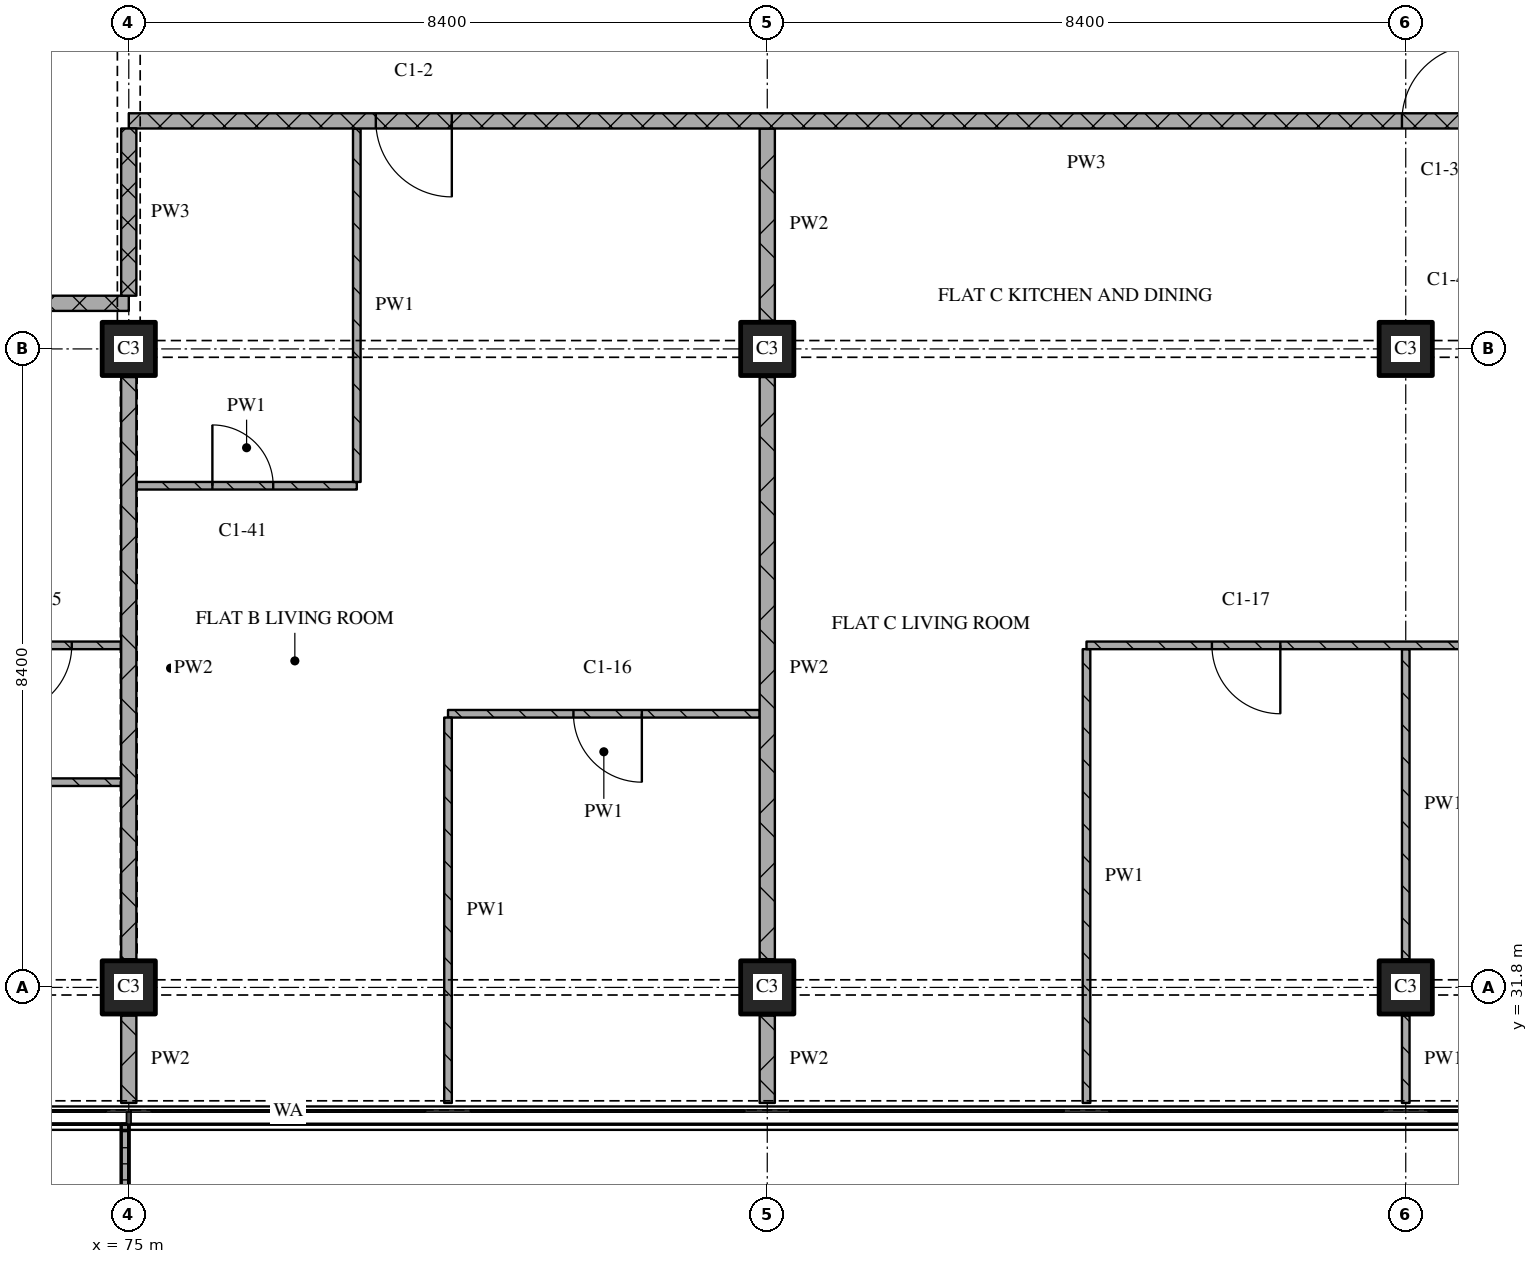
"""IFC4 building model, lengths in metres.
Left out: names, types, materials, properties, quantities, classifications, styles, units other than length and angle.
Written with IfcOpenShell. Run it as: python <this file> out.ifc"""

import sys

from ifc_helpers import new_model, si_unit, direction, frame, frame_2d, origin, origin_2d, place, context, subcontext, project, spatial, polyline, rectangle, outline, extrude, element, fill, save


model = new_model("IFC4")
c1 = context("Model", 3, precision=1e-05, world=origin(), true_north=direction((0.0, 1.0)))
c2 = subcontext(c1, "Body", "Model", "MODEL_VIEW")
j1 = project(units=[si_unit("LENGTHUNIT", "METRE"), si_unit("PLANEANGLEUNIT", "RADIAN")], contexts=[c1])
p1 = place(None, origin())
s1 = spatial("IfcSite", under=j1, at=p1, CompositionType="ELEMENT")
p2 = place(p1, origin())
s2 = spatial("IfcBuilding", under=s1, at=p2, CompositionType="ELEMENT")
p3 = place(p2, frame((0.0, 0.0, 154.65)))
s3 = spatial("IfcBuildingStorey", under=s2, at=p3, CompositionType="ELEMENT", Elevation=154.65)
for number, where, z_axis, x_axis in (
    (1, (75.0, 31.8, 0.0), (0.0, 0.0, 1.0), (1.0, 0.0, 0.0)),
    (2, (75.0, 40.2, 0.0), (0.0, 0.0, 1.0), (1.0, 0.0, 0.0)),
    (3, (83.4, 31.8, 0.0), (0.0, 0.0, 1.0), (1.0, 0.0, 0.0)),
    (4, (83.4, 40.2, 0.0), (0.0, 0.0, 1.0), (1.0, 0.0, 0.0)),
    (5, (91.8, 31.8, 0.0), (0.0, 0.0, 1.0), (1.0, 0.0, 0.0)),
    (6, (91.8, 40.2, 0.0), (0.0, 0.0, 1.0), (1.0, 0.0, 0.0)),
):
    element("IfcColumn", number, at=place(p3, frame(where, z_axis=z_axis, x_axis=x_axis)), inside=s3, PredefinedType="COLUMN", context=c2, shape_type="SweptSolid", body=[
        extrude(rectangle(XDim=0.7, YDim=0.7, at=origin_2d()), origin(), (0.0, 0.0, 1.0), 3.6),
    ])
p4 = place(p3, origin())
e7 = element("IfcWall", 7, at=p4, inside=s3, PredefinedType="SOLIDWALL", context=c2, shape_type="SweptSolid", body=[
    extrude(outline(polyline([(70.8, 30.0), (70.9, 30.0), (70.9, 28.367), (74.9, 28.367), (74.9, 30.0), (75.0, 30.0), (75.0, 28.267), (70.8, 28.267), (70.8, 30.0)])), origin(), (0.0, 0.0, 1.0), 1.0),
])
p5 = place(p3, frame((74.9, 34.5, 0.0), z_axis=(0.0, 0.0, 1.0), x_axis=(-1.0, 0.0, 0.0)))
e8 = element("IfcWall", 8, at=p5, inside=s3, PredefinedType="PARTITIONING", context=c2, shape_type="SweptSolid", body=[
    extrude(rectangle(XDim=16.7, YDim=0.1, at=frame_2d((8.35, 0.0))), origin(), (0.0, 0.0, 1.0), 3.32),
])
p6 = place(p5, frame((3.65, 0.0, 0.0)))
e9 = element("IfcOpeningElement", 9, at=p6, cuts=e8, PredefinedType="OPENING", context=c2, shape_type="SweptSolid", body=[
    extrude(rectangle(XDim=0.9, YDim=2.1, at=frame_2d((0.45, 1.05))), frame((0.0, 0.06, 0.0), z_axis=(0.0, -1.0, 0.0), x_axis=(1.0, 0.0, 0.0)), (0.0, 0.0, 1.0), 0.12),
])
p7 = place(p5, frame((12.05, 0.0, 0.0)))
e10 = element("IfcOpeningElement", 10, at=p7, cuts=e8, PredefinedType="OPENING", context=c2, shape_type="SweptSolid", body=[
    extrude(rectangle(XDim=0.9, YDim=2.1, at=frame_2d((0.45, 1.05))), frame((0.0, 0.06, 0.0), z_axis=(0.0, -1.0, 0.0), x_axis=(1.0, 0.0, 0.0)), (0.0, 0.0, 1.0), 0.12),
])
p8 = place(p3, frame((83.3, 35.4, 0.0), z_axis=(0.0, 0.0, 1.0), x_axis=(-1.0, 0.0, 0.0)))
e11 = element("IfcWall", 11, at=p8, inside=s3, PredefinedType="PARTITIONING", context=c2, shape_type="SweptSolid", body=[
    extrude(rectangle(XDim=4.1, YDim=0.1, at=frame_2d((2.05, 0.0))), origin(), (0.0, 0.0, 1.0), 3.32),
])
p9 = place(p8, frame((1.55, 0.0, 0.0)))
e12 = element("IfcOpeningElement", 12, at=p9, cuts=e11, PredefinedType="OPENING", context=c2, shape_type="SweptSolid", body=[
    extrude(rectangle(XDim=0.9, YDim=2.1, at=frame_2d((0.45, 1.05))), frame((0.0, 0.06, 0.0), z_axis=(0.0, -1.0, 0.0), x_axis=(1.0, 0.0, 0.0)), (0.0, 0.0, 1.0), 0.12),
])
p10 = place(p3, frame((63.6, 36.3, 0.0), z_axis=(0.0, 0.0, 1.0), x_axis=(1.0, 0.0, 0.0)))
e13 = element("IfcWall", 13, at=p10, inside=s3, PredefinedType="PARTITIONING", context=c2, shape_type="SweptSolid", body=[
    extrude(rectangle(XDim=11.3, YDim=0.1, at=frame_2d((5.65, 0.0))), origin(), (0.0, 0.0, 1.0), 3.32),
])
p11 = place(p10, frame((6.35, 0.0, 0.0)))
e14 = element("IfcOpeningElement", 14, at=p11, cuts=e13, PredefinedType="OPENING", context=c2, shape_type="SweptSolid", body=[
    extrude(rectangle(XDim=0.8, YDim=2.1, at=frame_2d((0.4, 1.05))), frame((0.0, 0.06, 0.0), z_axis=(0.0, -1.0, 0.0), x_axis=(1.0, 0.0, 0.0)), (0.0, 0.0, 1.0), 0.12),
])
p12 = place(p10, frame((9.75, 0.0, 0.0)))
e15 = element("IfcOpeningElement", 15, at=p12, cuts=e13, PredefinedType="OPENING", context=c2, shape_type="SweptSolid", body=[
    extrude(rectangle(XDim=0.9, YDim=2.1, at=frame_2d((0.45, 1.05))), frame((0.0, 0.06, 0.0), z_axis=(0.0, -1.0, 0.0), x_axis=(1.0, 0.0, 0.0)), (0.0, 0.0, 1.0), 0.12),
])
p13 = place(p3, frame((75.1, 38.4, 0.0), z_axis=(0.0, 0.0, 1.0), x_axis=(1.0, 0.0, 0.0)))
e16 = element("IfcWall", 16, at=p13, inside=s3, PredefinedType="PARTITIONING", context=c2, shape_type="SweptSolid", body=[
    extrude(rectangle(XDim=2.9, YDim=0.1, at=frame_2d((1.45, 0.0))), origin(), (0.0, 0.0, 1.0), 3.32),
])
p14 = place(p13, frame((1.0, 0.0, 0.0)))
e17 = element("IfcOpeningElement", 17, at=p14, cuts=e16, PredefinedType="OPENING", context=c2, shape_type="SweptSolid", body=[
    extrude(rectangle(XDim=0.8, YDim=2.1, at=frame_2d((0.4, 1.05))), frame((0.0, 0.06, 0.0), z_axis=(0.0, -1.0, 0.0), x_axis=(1.0, 0.0, 0.0)), (0.0, 0.0, 1.0), 0.12),
])
p15 = place(p3, frame((75.0, 40.8, 0.0), z_axis=(0.0, 0.0, 1.0), x_axis=(-1.0, 0.0, 0.0)))
e18 = element("IfcWall", 18, at=p15, inside=s3, PredefinedType="PARTITIONING", context=c2, shape_type="SweptSolid", body=[
    extrude(rectangle(XDim=24.28, YDim=0.2, at=frame_2d((12.14, 0.0))), origin(), (0.0, 0.0, 1.0), 3.32),
])
p16 = place(p15, frame((11.65, 0.0, 0.0)))
e19 = element("IfcOpeningElement", 19, at=p16, cuts=e18, PredefinedType="OPENING", context=c2, shape_type="SweptSolid", body=[
    extrude(rectangle(XDim=1.0, YDim=2.1, at=frame_2d((0.5, 1.05))), frame((0.0, 0.11, 0.0), z_axis=(0.0, -1.0, 0.0), x_axis=(1.0, 0.0, 0.0)), (0.0, 0.0, 1.0), 0.22),
])
p17 = place(p3, frame((100.2, 43.2, 0.0), z_axis=(0.0, 0.0, 1.0), x_axis=(-1.0, 0.0, 0.0)))
e20 = element("IfcWall", 20, at=p17, inside=s3, PredefinedType="PARTITIONING", context=c2, shape_type="SweptSolid", body=[
    extrude(rectangle(XDim=25.2, YDim=0.2, at=frame_2d((12.6, 0.0))), origin(), (0.0, 0.0, 1.0), 3.32),
])
p18 = place(p17, frame((7.45, 0.0, 0.0)))
e21 = element("IfcOpeningElement", 21, at=p18, cuts=e20, PredefinedType="OPENING", context=c2, shape_type="SweptSolid", body=[
    extrude(rectangle(XDim=1.0, YDim=2.1, at=frame_2d((0.5, 1.05))), frame((0.0, 0.11, 0.0), z_axis=(0.0, -1.0, 0.0), x_axis=(1.0, 0.0, 0.0)), (0.0, 0.0, 1.0), 0.22),
])
p19 = place(p17, frame((20.95, 0.0, 0.0)))
e22 = element("IfcOpeningElement", 22, at=p19, cuts=e20, PredefinedType="OPENING", context=c2, shape_type="SweptSolid", body=[
    extrude(rectangle(XDim=1.0, YDim=2.1, at=frame_2d((0.5, 1.05))), frame((0.0, 0.11, 0.0), z_axis=(0.0, -1.0, 0.0), x_axis=(1.0, 0.0, 0.0)), (0.0, 0.0, 1.0), 0.22),
])
p20 = place(p3, frame((75.0, 43.1, 0.0), z_axis=(0.0, 0.0, 1.0), x_axis=(0.0, -1.0, 0.0)))
e23 = element("IfcWall", 23, at=p20, inside=s3, PredefinedType="PARTITIONING", context=c2, shape_type="SweptSolid", body=[
    extrude(rectangle(XDim=2.2, YDim=0.2, at=frame_2d((1.1, 0.0))), origin(), (0.0, 0.0, 1.0), 2.43),
])
p21 = place(p3, frame((75.0, 31.43, 0.0), z_axis=(0.0, 0.0, 1.0), x_axis=(0.0, -1.0, 0.0)))
e24 = element("IfcWall", 24, at=p21, inside=s3, PredefinedType="PARTITIONING", context=c2, shape_type="SweptSolid", body=[
    extrude(rectangle(XDim=1.15, YDim=0.2, at=frame_2d((0.575, 0.0))), origin(), (0.0, 0.0, 1.0), 3.32),
])
p22 = place(p3, frame((75.0, 39.83, 0.0), z_axis=(0.0, 0.0, 1.0), x_axis=(0.0, -1.0, 0.0)))
e25 = element("IfcWall", 25, at=p22, inside=s3, PredefinedType="PARTITIONING", context=c2, shape_type="SweptSolid", body=[
    extrude(rectangle(XDim=7.66, YDim=0.2, at=frame_2d((3.83, 0.0))), origin(), (0.0, 0.0, 1.0), 2.72),
])
p23 = place(p3, frame((78.0, 43.1, 0.0), z_axis=(0.0, 0.0, 1.0), x_axis=(0.0, -1.0, 0.0)))
e26 = element("IfcWall", 26, at=p23, inside=s3, PredefinedType="PARTITIONING", context=c2, shape_type="SweptSolid", body=[
    extrude(rectangle(XDim=4.65, YDim=0.1, at=frame_2d((2.325, 0.0))), origin(), (0.0, 0.0, 1.0), 3.32),
])
p24 = place(p3, frame((79.2, 35.35, 0.0), z_axis=(0.0, 0.0, 1.0), x_axis=(0.0, -1.0, 0.0)))
e27 = element("IfcWall", 27, at=p24, inside=s3, PredefinedType="PARTITIONING", context=c2, shape_type="SweptSolid", body=[
    extrude(rectangle(XDim=5.07, YDim=0.1, at=frame_2d((2.535, 0.0))), origin(), (0.0, 0.0, 1.0), 3.32),
])
p25 = place(p3, frame((83.4, 31.43, 0.0), z_axis=(0.0, 0.0, 1.0), x_axis=(0.0, -1.0, 0.0)))
e28 = element("IfcWall", 28, at=p25, inside=s3, PredefinedType="PARTITIONING", context=c2, shape_type="SweptSolid", body=[
    extrude(rectangle(XDim=1.15, YDim=0.2, at=frame_2d((0.575, 0.0))), origin(), (0.0, 0.0, 1.0), 3.32),
])
p26 = place(p3, frame((83.4, 39.83, 0.0), z_axis=(0.0, 0.0, 1.0), x_axis=(0.0, -1.0, 0.0)))
e29 = element("IfcWall", 29, at=p26, inside=s3, PredefinedType="PARTITIONING", context=c2, shape_type="SweptSolid", body=[
    extrude(rectangle(XDim=7.66, YDim=0.2, at=frame_2d((3.83, 0.0))), origin(), (0.0, 0.0, 1.0), 3.32),
])
p27 = place(p3, frame((83.4, 43.1, 0.0), z_axis=(0.0, 0.0, 1.0), x_axis=(0.0, -1.0, 0.0)))
e30 = element("IfcWall", 30, at=p27, inside=s3, PredefinedType="PARTITIONING", context=c2, shape_type="SweptSolid", body=[
    extrude(rectangle(XDim=2.53, YDim=0.2, at=frame_2d((1.265, 0.0))), origin(), (0.0, 0.0, 1.0), 3.32),
])
p28 = place(p3, frame((87.6, 36.25, 0.0), z_axis=(0.0, 0.0, 1.0), x_axis=(0.0, -1.0, 0.0)))
e31 = element("IfcWall", 31, at=p28, inside=s3, PredefinedType="PARTITIONING", context=c2, shape_type="SweptSolid", body=[
    extrude(rectangle(XDim=5.97, YDim=0.1, at=frame_2d((2.985, 0.0))), origin(), (0.0, 0.0, 1.0), 3.32),
])
p29 = place(p3, frame((91.8, 31.43, 0.0), z_axis=(0.0, 0.0, 1.0), x_axis=(0.0, -1.0, 0.0)))
e32 = element("IfcWall", 32, at=p29, inside=s3, PredefinedType="PARTITIONING", context=c2, shape_type="SweptSolid", body=[
    extrude(rectangle(XDim=1.15, YDim=0.1, at=frame_2d((0.575, 0.0))), origin(), (0.0, 0.0, 1.0), 3.32),
])
p30 = place(p3, frame((91.8, 36.25, 0.0), z_axis=(0.0, 0.0, 1.0), x_axis=(0.0, -1.0, 0.0)))
e33 = element("IfcWall", 33, at=p30, inside=s3, PredefinedType="PARTITIONING", context=c2, shape_type="SweptSolid", body=[
    extrude(rectangle(XDim=4.08, YDim=0.1, at=frame_2d((2.04, 0.0))), origin(), (0.0, 0.0, 1.0), 3.32),
])
p31 = place(p3, frame((100.1, 36.3, 0.0), z_axis=(0.0, 0.0, 1.0), x_axis=(-1.0, 0.0, 0.0)))
e34 = element("IfcWall", 34, at=p31, inside=s3, PredefinedType="PARTITIONING", context=c2, shape_type="SweptSolid", body=[
    extrude(rectangle(XDim=12.5, YDim=0.1, at=frame_2d((6.25, 0.0))), origin(), (0.0, 0.0, 1.0), 3.32),
])
p32 = place(p31, frame((3.65, 0.0, 0.0)))
e35 = element("IfcOpeningElement", 35, at=p32, cuts=e34, PredefinedType="OPENING", context=c2, shape_type="SweptSolid", body=[
    extrude(rectangle(XDim=0.9, YDim=2.1, at=frame_2d((0.45, 1.05))), frame((0.0, 0.06, 0.0), z_axis=(0.0, -1.0, 0.0), x_axis=(1.0, 0.0, 0.0)), (0.0, 0.0, 1.0), 0.12),
])
p33 = place(p31, frame((9.95, 0.0, 0.0)))
e36 = element("IfcOpeningElement", 36, at=p33, cuts=e34, PredefinedType="OPENING", context=c2, shape_type="SweptSolid", body=[
    extrude(rectangle(XDim=0.9, YDim=2.1, at=frame_2d((0.45, 1.05))), frame((0.0, 0.06, 0.0), z_axis=(0.0, -1.0, 0.0), x_axis=(1.0, 0.0, 0.0)), (0.0, 0.0, 1.0), 0.12),
])
p34 = place(p9, origin())
e37 = element("IfcDoor", 37, at=p34, inside=s3, OperationType="SINGLE_SWING_LEFT", PredefinedType="DOOR", context=c2, shape_type="SweptSolid", body=[
    extrude(rectangle(XDim=0.9, YDim=2.1, at=frame_2d((0.45, 1.05))), frame((0.0, 0.025, 0.0), z_axis=(0.0, -1.0, 0.0), x_axis=(1.0, 0.0, 0.0)), (0.0, 0.0, 1.0), 0.05),
])
fill(e12, e37)
p35 = place(p12, origin())
e38 = element("IfcDoor", 38, at=p35, inside=s3, OperationType="SINGLE_SWING_RIGHT", PredefinedType="DOOR", context=c2, shape_type="SweptSolid", body=[
    extrude(rectangle(XDim=0.9, YDim=2.1, at=frame_2d((0.45, 1.05))), frame((0.0, 0.025, 0.0), z_axis=(0.0, -1.0, 0.0), x_axis=(1.0, 0.0, 0.0)), (0.0, 0.0, 1.0), 0.05),
])
fill(e15, e38)
p36 = place(p14, origin())
e39 = element("IfcDoor", 39, at=p36, inside=s3, OperationType="SINGLE_SWING_LEFT", PredefinedType="DOOR", context=c2, shape_type="SweptSolid", body=[
    extrude(rectangle(XDim=0.8, YDim=2.1, at=frame_2d((0.4, 1.05))), frame((0.0, 0.025, 0.0), z_axis=(0.0, -1.0, 0.0), x_axis=(1.0, 0.0, 0.0)), (0.0, 0.0, 1.0), 0.05),
])
fill(e17, e39)
p37 = place(p18, origin())
e40 = element("IfcDoor", 40, at=p37, inside=s3, OperationType="SINGLE_SWING_RIGHT", PredefinedType="DOOR", context=c2, shape_type="SweptSolid", body=[
    extrude(rectangle(XDim=1.0, YDim=2.1, at=frame_2d((0.5, 1.05))), frame((0.0, 0.025, 0.0), z_axis=(0.0, -1.0, 0.0), x_axis=(1.0, 0.0, 0.0)), (0.0, 0.0, 1.0), 0.05),
])
fill(e21, e40)
p38 = place(p19, origin())
e41 = element("IfcDoor", 41, at=p38, inside=s3, OperationType="SINGLE_SWING_LEFT", PredefinedType="DOOR", context=c2, shape_type="SweptSolid", body=[
    extrude(rectangle(XDim=1.0, YDim=2.1, at=frame_2d((0.5, 1.05))), frame((0.0, 0.025, 0.0), z_axis=(0.0, -1.0, 0.0), x_axis=(1.0, 0.0, 0.0)), (0.0, 0.0, 1.0), 0.05),
])
fill(e22, e41)
p39 = place(p33, origin())
e42 = element("IfcDoor", 42, at=p39, inside=s3, OperationType="SINGLE_SWING_LEFT", PredefinedType="DOOR", context=c2, shape_type="SweptSolid", body=[
    extrude(rectangle(XDim=0.9, YDim=2.1, at=frame_2d((0.45, 1.05))), frame((0.0, 0.025, 0.0), z_axis=(0.0, -1.0, 0.0), x_axis=(1.0, 0.0, 0.0)), (0.0, 0.0, 1.0), 0.05),
])
fill(e36, e42)
save(model, sys.argv[1])
